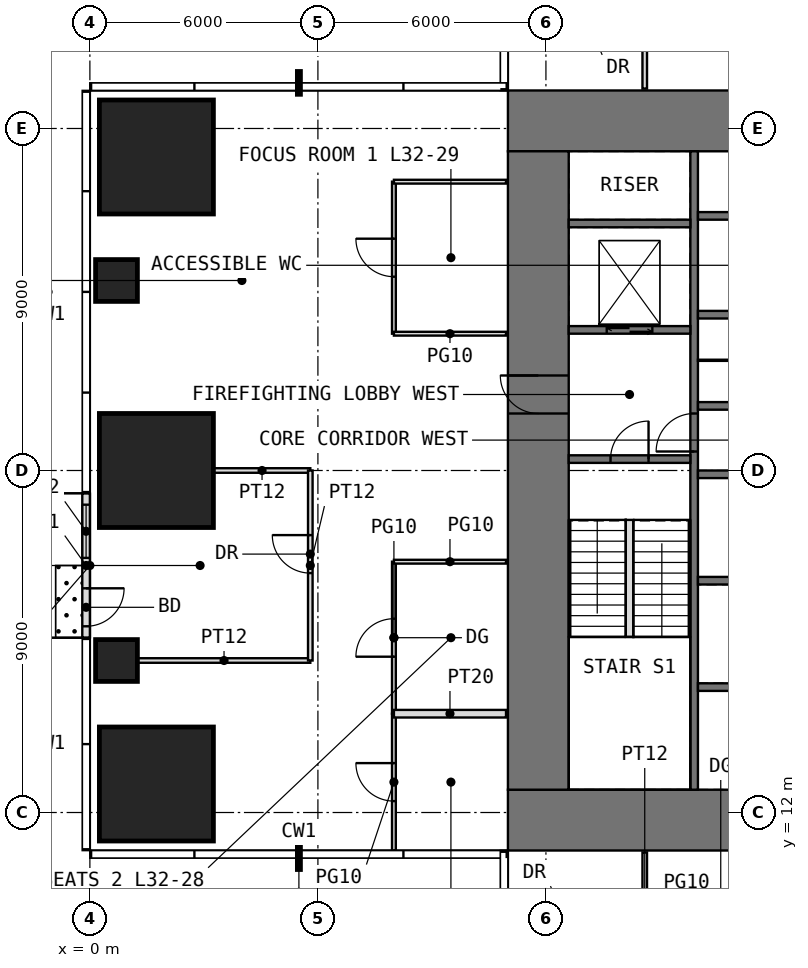
"""IFC4 building model, lengths in metres.
Left out: names, types, materials, properties, quantities, classifications, styles, units other than length and angle.
Written with IfcOpenShell. Run it as: python <this file> out.ifc"""

import sys

from ifc_helpers import new_model, si_unit, direction, frame, frame_2d, origin, origin_2d, place, context, subcontext, project, spatial, rectangle, extrude, element, fill, save


model = new_model("IFC4")
c1 = context("Model", 3, precision=1e-05, world=origin(), true_north=direction((0.0, 1.0)))
c2 = subcontext(c1, "Body", "Model", "MODEL_VIEW")
j1 = project(units=[si_unit("LENGTHUNIT", "METRE"), si_unit("PLANEANGLEUNIT", "RADIAN")], contexts=[c1])
p1 = place(None, origin())
s1 = spatial("IfcSite", under=j1, at=p1, CompositionType="ELEMENT")
p2 = place(p1, origin())
s2 = spatial("IfcBuilding", under=s1, at=p2, CompositionType="ELEMENT")
p3 = place(p2, frame((0.0, 0.0, 136.5)))
s3 = spatial("IfcBuildingStorey", under=s2, at=p3, CompositionType="ELEMENT", Elevation=136.5)
p4 = place(p3, frame((1.75, 12.75, 0.0), z_axis=(0.0, 0.0, 1.0), x_axis=(1.0, 0.0, 0.0)))
e1 = element("IfcColumn", 1, at=p4, inside=s3, PredefinedType="COLUMN", context=c2, shape_type="SweptSolid", body=[
    extrude(rectangle(XDim=3.0, YDim=3.0, at=origin_2d()), origin(), (0.0, 0.0, 1.0), 4.0),
])
p5 = place(p3, frame((0.7, 16.0, 0.0), z_axis=(0.0, 0.0, 1.0), x_axis=(1.0, 0.0, 0.0)))
e2 = element("IfcColumn", 2, at=p5, inside=s3, PredefinedType="COLUMN", context=c2, shape_type="SweptSolid", body=[
    extrude(rectangle(XDim=1.1, YDim=1.1, at=origin_2d()), origin(), (0.0, 0.0, 1.0), 4.0),
])
p6 = place(p3, frame((1.75, 21.0, 0.0), z_axis=(0.0, 0.0, 1.0), x_axis=(1.0, 0.0, 0.0)))
e3 = element("IfcColumn", 3, at=p6, inside=s3, PredefinedType="COLUMN", context=c2, shape_type="SweptSolid", body=[
    extrude(rectangle(XDim=3.0, YDim=3.0, at=origin_2d()), origin(), (0.0, 0.0, 1.0), 4.0),
])
p7 = place(p3, frame((0.7, 26.0, 0.0), z_axis=(0.0, 0.0, 1.0), x_axis=(1.0, 0.0, 0.0)))
e4 = element("IfcColumn", 4, at=p7, inside=s3, PredefinedType="COLUMN", context=c2, shape_type="SweptSolid", body=[
    extrude(rectangle(XDim=1.1, YDim=1.1, at=origin_2d()), origin(), (0.0, 0.0, 1.0), 4.0),
])
p8 = place(p3, frame((1.75, 29.25, 0.0), z_axis=(0.0, 0.0, 1.0), x_axis=(1.0, 0.0, 0.0)))
e5 = element("IfcColumn", 5, at=p8, inside=s3, PredefinedType="COLUMN", context=c2, shape_type="SweptSolid", body=[
    extrude(rectangle(XDim=3.0, YDim=3.0, at=origin_2d()), origin(), (0.0, 0.0, 1.0), 4.0),
])
p9 = place(p3, frame((-0.1, 20.4, 0.0), z_axis=(0.0, 0.0, 1.0), x_axis=(0.0, -1.0, 0.0)))
e6 = element("IfcWall", 6, at=p9, inside=s3, PredefinedType="USERDEFINED", context=c2, shape_type="SweptSolid", body=[
    extrude(rectangle(XDim=3.8, YDim=0.2, at=frame_2d((1.9, 0.0))), origin(), (0.0, 0.0, 1.0), 3.75),
])
p10 = place(p9, frame((2.5, 0.0, 0.0)))
e7 = element("IfcOpeningElement", 7, at=p10, cuts=e6, PredefinedType="OPENING", context=c2, shape_type="SweptSolid", body=[
    extrude(rectangle(XDim=1.0, YDim=2.4, at=frame_2d((0.5, 1.2))), frame((0.0, 0.11, 0.0), z_axis=(0.0, -1.0, 0.0), x_axis=(1.0, 0.0, 0.0)), (0.0, 0.0, 1.0), 0.22),
])
p11 = place(p9, frame((0.3, 0.0, 0.3)))
e8 = element("IfcOpeningElement", 8, at=p11, cuts=e6, PredefinedType="OPENING", context=c2, shape_type="SweptSolid", body=[
    extrude(rectangle(XDim=1.4, YDim=2.7, at=frame_2d((0.7, 1.35))), frame((0.0, 0.11, 0.0), z_axis=(0.0, -1.0, 0.0), x_axis=(1.0, 0.0, 0.0)), (0.0, 0.0, 1.0), 0.22),
])
p12 = place(p3, frame((11.0, 11.8, -0.05), z_axis=(0.0, 0.0, 1.0), x_axis=(1.0, 0.0, 0.0)))
e9 = element("IfcWall", 9, at=p12, inside=s3, PredefinedType="SHEAR", context=c2, shape_type="SweptSolid", body=[
    extrude(rectangle(XDim=20.0, YDim=1.6, at=frame_2d((10.0, 0.0))), origin(), (0.0, 0.0, 1.0), 4.0),
])
p13 = place(p12, frame((9.0, 0.0, 0.05)))
e10 = element("IfcOpeningElement", 10, at=p13, cuts=e9, PredefinedType="OPENING", context=c2, shape_type="SweptSolid", body=[
    extrude(rectangle(XDim=2.0, YDim=2.2, at=frame_2d((1.0, 1.1))), frame((0.0, 0.81, 0.0), z_axis=(0.0, -1.0, 0.0), x_axis=(1.0, 0.0, 0.0)), (0.0, 0.0, 1.0), 1.62),
])
p14 = place(p3, frame((11.0, 30.2, -0.05), z_axis=(0.0, 0.0, 1.0), x_axis=(1.0, 0.0, 0.0)))
e11 = element("IfcWall", 11, at=p14, inside=s3, PredefinedType="SHEAR", context=c2, shape_type="SweptSolid", body=[
    extrude(rectangle(XDim=20.0, YDim=1.6, at=frame_2d((10.0, 0.0))), origin(), (0.0, 0.0, 1.0), 4.0),
])
p15 = place(p14, frame((9.0, 0.0, 0.05)))
e12 = element("IfcOpeningElement", 12, at=p15, cuts=e11, PredefinedType="OPENING", context=c2, shape_type="SweptSolid", body=[
    extrude(rectangle(XDim=2.0, YDim=2.2, at=frame_2d((1.0, 1.1))), frame((0.0, 0.81, 0.0), z_axis=(0.0, -1.0, 0.0), x_axis=(1.0, 0.0, 0.0)), (0.0, 0.0, 1.0), 1.62),
])
p16 = place(p3, frame((11.8, 12.6, -0.05), z_axis=(0.0, 0.0, 1.0), x_axis=(0.0, 1.0, 0.0)))
e13 = element("IfcWall", 13, at=p16, inside=s3, PredefinedType="SHEAR", context=c2, shape_type="SweptSolid", body=[
    extrude(rectangle(XDim=16.8, YDim=1.6, at=frame_2d((8.4, 0.0))), origin(), (0.0, 0.0, 1.0), 4.0),
])
p17 = place(p16, frame((9.9, 0.0, 0.05)))
e14 = element("IfcOpeningElement", 14, at=p17, cuts=e13, PredefinedType="OPENING", context=c2, shape_type="SweptSolid", body=[
    extrude(rectangle(XDim=1.0, YDim=2.2, at=frame_2d((0.5, 1.1))), frame((0.0, 0.81, 0.0), z_axis=(0.0, -1.0, 0.0), x_axis=(1.0, 0.0, 0.0)), (0.0, 0.0, 1.0), 1.62),
])
p18 = place(p3, frame((15.9, 12.6, -0.05), z_axis=(0.0, 0.0, 1.0), x_axis=(0.0, 1.0, 0.0)))
e15 = element("IfcWall", 15, at=p18, inside=s3, PredefinedType="SHEAR", context=c2, shape_type="SweptSolid", body=[
    extrude(rectangle(XDim=16.8, YDim=0.2, at=frame_2d((8.4, 0.0))), origin(), (0.0, 0.0, 1.0), 4.0),
])
p19 = place(p18, frame((8.9, 0.0, 0.05)))
e16 = element("IfcOpeningElement", 16, at=p19, cuts=e15, PredefinedType="OPENING", context=c2, shape_type="SweptSolid", body=[
    extrude(rectangle(XDim=1.0, YDim=2.2, at=frame_2d((0.5, 1.1))), frame((0.0, 0.11, 0.0), z_axis=(0.0, -1.0, 0.0), x_axis=(1.0, 0.0, 0.0)), (0.0, 0.0, 1.0), 0.22),
])
p20 = place(p3, frame((12.6, 21.3, -0.05), z_axis=(0.0, 0.0, 1.0), x_axis=(1.0, 0.0, 0.0)))
e17 = element("IfcWall", 17, at=p20, inside=s3, PredefinedType="SHEAR", context=c2, shape_type="SweptSolid", body=[
    extrude(rectangle(XDim=3.2, YDim=0.2, at=frame_2d((1.6, 0.0))), origin(), (0.0, 0.0, 1.0), 4.0),
])
p21 = place(p20, frame((1.1, 0.0, 0.05)))
e18 = element("IfcOpeningElement", 18, at=p21, cuts=e17, PredefinedType="OPENING", context=c2, shape_type="SweptSolid", body=[
    extrude(rectangle(XDim=1.0, YDim=2.2, at=frame_2d((0.5, 1.1))), frame((0.0, 0.11, 0.0), z_axis=(0.0, -1.0, 0.0), x_axis=(1.0, 0.0, 0.0)), (0.0, 0.0, 1.0), 0.22),
])
p22 = place(p3, frame((12.6, 24.7, -0.05), z_axis=(0.0, 0.0, 1.0), x_axis=(1.0, 0.0, 0.0)))
e19 = element("IfcWall", 19, at=p22, inside=s3, PredefinedType="SHEAR", context=c2, shape_type="SweptSolid", body=[
    extrude(rectangle(XDim=3.2, YDim=0.2, at=frame_2d((1.6, 0.0))), origin(), (0.0, 0.0, 1.0), 4.0),
])
p23 = place(p22, frame((1.0, 0.0, 0.05)))
e20 = element("IfcOpeningElement", 20, at=p23, cuts=e19, PredefinedType="OPENING", context=c2, shape_type="SweptSolid", body=[
    extrude(rectangle(XDim=1.2, YDim=2.2, at=frame_2d((0.6, 1.1))), frame((0.0, 0.11, 0.0), z_axis=(0.0, -1.0, 0.0), x_axis=(1.0, 0.0, 0.0)), (0.0, 0.0, 1.0), 0.22),
])
for number, where, z_axis, x_axis in (
    (21, (12.6, 27.5, -0.05), (0.0, 0.0, 1.0), (1.0, 0.0, 0.0)),
    (22, (16.0, 15.3, -0.05), (0.0, 0.0, 1.0), (1.0, 0.0, 0.0)),
    (23, (16.0, 18.1, -0.05), (0.0, 0.0, 1.0), (1.0, 0.0, 0.0)),
    (24, (16.0, 20.9, -0.05), (0.0, 0.0, 1.0), (1.0, 0.0, 0.0)),
    (25, (16.0, 22.7, -0.05), (0.0, 0.0, 1.0), (1.0, 0.0, 0.0)),
    (26, (16.0, 25.1, -0.05), (0.0, 0.0, 1.0), (1.0, 0.0, 0.0)),
    (27, (16.0, 27.7, -0.05), (0.0, 0.0, 1.0), (1.0, 0.0, 0.0)),
):
    element("IfcWall", number, at=place(p3, frame(where, z_axis=z_axis, x_axis=x_axis)), inside=s3, PredefinedType="SHEAR", context=c2, shape_type="SweptSolid", body=[
        extrude(rectangle(XDim=3.2, YDim=0.2, at=frame_2d((1.6, 0.0))), origin(), (0.0, 0.0, 1.0), 4.0),
    ])
p24 = place(p3, frame((16.0, 23.9, 0.0), z_axis=(0.0, 0.0, 1.0), x_axis=(1.0, 0.0, 0.0)))
e28 = element("IfcWall", 28, at=p24, inside=s3, PredefinedType="PARTITIONING", context=c2, shape_type="SweptSolid", body=[
    extrude(rectangle(XDim=1.4, YDim=0.03, at=frame_2d((0.7, 0.0))), origin(), (0.0, 0.0, 1.0), 3.75),
])
p25 = place(p3, frame((1.26, 16.0, 0.0), z_axis=(0.0, 0.0, 1.0), x_axis=(1.0, 0.0, 0.0)))
e29 = element("IfcWall", 29, at=p25, inside=s3, PredefinedType="PARTITIONING", context=c2, shape_type="SweptSolid", body=[
    extrude(rectangle(XDim=4.54, YDim=0.12, at=frame_2d((2.27, 0.0))), origin(), (0.0, 0.0, 1.0), 3.75),
])
p26 = place(p3, frame((3.26, 21.0, 0.0), z_axis=(0.0, 0.0, 1.0), x_axis=(1.0, 0.0, 0.0)))
e30 = element("IfcWall", 30, at=p26, inside=s3, PredefinedType="PARTITIONING", context=c2, shape_type="SweptSolid", body=[
    extrude(rectangle(XDim=2.54, YDim=0.12, at=frame_2d((1.27, 0.0))), origin(), (0.0, 0.0, 1.0), 3.75),
])
p27 = place(p3, frame((5.8, 16.0, 0.0), z_axis=(0.0, 0.0, 1.0), x_axis=(0.0, 1.0, 0.0)))
e31 = element("IfcWall", 31, at=p27, inside=s3, PredefinedType="PARTITIONING", context=c2, shape_type="SweptSolid", body=[
    extrude(rectangle(XDim=5.0, YDim=0.12, at=frame_2d((2.5, 0.0))), origin(), (0.0, 0.0, 1.0), 3.75),
])
p28 = place(p27, frame((2.3, 0.0, 0.0)))
e32 = element("IfcOpeningElement", 32, at=p28, cuts=e31, PredefinedType="OPENING", context=c2, shape_type="SweptSolid", body=[
    extrude(rectangle(XDim=1.0, YDim=2.2, at=frame_2d((0.5, 1.1))), frame((0.0, 0.07, 0.0), z_axis=(0.0, -1.0, 0.0), x_axis=(1.0, 0.0, 0.0)), (0.0, 0.0, 1.0), 0.14),
])
p29 = place(p3, frame((8.0, 11.0, 0.0), z_axis=(0.0, 0.0, 1.0), x_axis=(0.0, 1.0, 0.0)))
e33 = element("IfcWall", 33, at=p29, inside=s3, PredefinedType="PARTITIONING", context=c2, shape_type="SweptSolid", body=[
    extrude(rectangle(XDim=3.6, YDim=0.1, at=frame_2d((1.8, 0.0))), origin(), (0.0, 0.0, 1.0), 3.75),
])
p30 = place(p29, frame((1.3, 0.0, 0.0)))
e34 = element("IfcOpeningElement", 34, at=p30, cuts=e33, PredefinedType="OPENING", context=c2, shape_type="SweptSolid", body=[
    extrude(rectangle(XDim=1.0, YDim=2.4, at=frame_2d((0.5, 1.2))), frame((0.0, 0.06, 0.0), z_axis=(0.0, -1.0, 0.0), x_axis=(1.0, 0.0, 0.0)), (0.0, 0.0, 1.0), 0.12),
])
p31 = place(p3, frame((8.0, 14.6, 0.0), z_axis=(0.0, 0.0, 1.0), x_axis=(0.0, 1.0, 0.0)))
e35 = element("IfcWall", 35, at=p31, inside=s3, PredefinedType="PARTITIONING", context=c2, shape_type="SweptSolid", body=[
    extrude(rectangle(XDim=4.0, YDim=0.1, at=frame_2d((2.0, 0.0))), origin(), (0.0, 0.0, 1.0), 3.75),
])
p32 = place(p31, frame((1.5, 0.0, 0.0)))
e36 = element("IfcOpeningElement", 36, at=p32, cuts=e35, PredefinedType="OPENING", context=c2, shape_type="SweptSolid", body=[
    extrude(rectangle(XDim=1.0, YDim=2.4, at=frame_2d((0.5, 1.2))), frame((0.0, 0.06, 0.0), z_axis=(0.0, -1.0, 0.0), x_axis=(1.0, 0.0, 0.0)), (0.0, 0.0, 1.0), 0.12),
])
p33 = place(p3, frame((8.0, 14.6, 0.0), z_axis=(0.0, 0.0, 1.0), x_axis=(1.0, 0.0, 0.0)))
e37 = element("IfcWall", 37, at=p33, inside=s3, PredefinedType="PARTITIONING", context=c2, shape_type="SweptSolid", body=[
    extrude(rectangle(XDim=2.95, YDim=0.2, at=frame_2d((1.475, 0.0))), origin(), (0.0, 0.0, 1.0), 3.75),
])
p34 = place(p3, frame((8.0, 18.6, 0.0), z_axis=(0.0, 0.0, 1.0), x_axis=(1.0, 0.0, 0.0)))
e38 = element("IfcWall", 38, at=p34, inside=s3, PredefinedType="PARTITIONING", context=c2, shape_type="SweptSolid", body=[
    extrude(rectangle(XDim=2.95, YDim=0.1, at=frame_2d((1.475, 0.0))), origin(), (0.0, 0.0, 1.0), 3.75),
])
p35 = place(p3, frame((8.0, 24.6, 0.0), z_axis=(0.0, 0.0, 1.0), x_axis=(0.0, 1.0, 0.0)))
e39 = element("IfcWall", 39, at=p35, inside=s3, PredefinedType="PARTITIONING", context=c2, shape_type="SweptSolid", body=[
    extrude(rectangle(XDim=4.0, YDim=0.1, at=frame_2d((2.0, 0.0))), origin(), (0.0, 0.0, 1.0), 3.75),
])
p36 = place(p35, frame((1.5, 0.0, 0.0)))
e40 = element("IfcOpeningElement", 40, at=p36, cuts=e39, PredefinedType="OPENING", context=c2, shape_type="SweptSolid", body=[
    extrude(rectangle(XDim=1.0, YDim=2.4, at=frame_2d((0.5, 1.2))), frame((0.0, 0.06, 0.0), z_axis=(0.0, -1.0, 0.0), x_axis=(1.0, 0.0, 0.0)), (0.0, 0.0, 1.0), 0.12),
])
for number, where, z_axis, x_axis in (
    (41, (8.0, 24.6, 0.0), (0.0, 0.0, 1.0), (1.0, 0.0, 0.0)),
    (42, (8.0, 28.6, 0.0), (0.0, 0.0, 1.0), (1.0, 0.0, 0.0)),
):
    element("IfcWall", number, at=place(p3, frame(where, z_axis=z_axis, x_axis=x_axis)), inside=s3, PredefinedType="PARTITIONING", context=c2, shape_type="SweptSolid", body=[
        extrude(rectangle(XDim=2.95, YDim=0.1, at=frame_2d((1.475, 0.0))), origin(), (0.0, 0.0, 1.0), 3.75),
    ])
for number, where, z_axis, x_axis in (
    (43, (14.6, 8.5, 0.0), (0.0, 0.0, 1.0), (0.0, 1.0, 0.0)),
    (44, (14.6, 31.05, 0.0), (0.0, 0.0, 1.0), (0.0, 1.0, 0.0)),
):
    element("IfcWall", number, at=place(p3, frame(where, z_axis=z_axis, x_axis=x_axis)), inside=s3, PredefinedType="PARTITIONING", context=c2, shape_type="SweptSolid", body=[
        extrude(rectangle(XDim=2.45, YDim=0.12, at=frame_2d((1.225, 0.0))), origin(), (0.0, 0.0, 1.0), 3.75),
    ])
p37 = place(p3, frame((14.2, 16.62, 0.0), z_axis=(0.0, 0.0, 1.0), x_axis=(0.0, 1.0, 0.0)))
e45 = element("IfcWall", 45, at=p37, inside=s3, PredefinedType="PARTITIONING", context=c2, shape_type="SweptSolid", body=[
    extrude(rectangle(XDim=3.08, YDim=0.2, at=frame_2d((1.54, 0.0))), origin(), (0.0, 0.0, 1.0), 4.0),
])
p38 = place(p10, origin())
e46 = element("IfcDoor", 46, at=p38, inside=s3, OperationType="SINGLE_SWING_LEFT", PredefinedType="DOOR", context=c2, shape_type="SweptSolid", body=[
    extrude(rectangle(XDim=1.0, YDim=2.4, at=frame_2d((0.5, 1.2))), frame((0.0, 0.025, 0.0), z_axis=(0.0, -1.0, 0.0), x_axis=(1.0, 0.0, 0.0)), (0.0, 0.0, 1.0), 0.05),
])
fill(e7, e46)
p39 = place(p11, origin())
e47 = element("IfcWindow", 47, at=p39, inside=s3, PartitioningType="SINGLE_PANEL", PredefinedType="WINDOW", context=c2, shape_type="SweptSolid", body=[
    extrude(rectangle(XDim=1.4, YDim=2.7, at=frame_2d((0.7, 1.35))), frame((0.0, 0.03, 0.0), z_axis=(0.0, -1.0, 0.0), x_axis=(1.0, 0.0, 0.0)), (0.0, 0.0, 1.0), 0.06),
])
fill(e8, e47)
p40 = place(p17, origin())
e48 = element("IfcDoor", 48, at=p40, inside=s3, OperationType="SINGLE_SWING_RIGHT", PredefinedType="DOOR", context=c2, shape_type="SweptSolid", body=[
    extrude(rectangle(XDim=1.0, YDim=2.2, at=frame_2d((0.5, 1.1))), frame((0.0, 0.025, 0.0), z_axis=(0.0, -1.0, 0.0), x_axis=(1.0, 0.0, 0.0)), (0.0, 0.0, 1.0), 0.05),
])
fill(e14, e48)
p41 = place(p21, origin())
e49 = element("IfcDoor", 49, at=p41, inside=s3, OperationType="SINGLE_SWING_RIGHT", PredefinedType="DOOR", context=c2, shape_type="SweptSolid", body=[
    extrude(rectangle(XDim=1.0, YDim=2.2, at=frame_2d((0.5, 1.1))), frame((0.0, 0.025, 0.0), z_axis=(0.0, -1.0, 0.0), x_axis=(1.0, 0.0, 0.0)), (0.0, 0.0, 1.0), 0.05),
])
fill(e18, e49)
p42 = place(p19, origin())
e50 = element("IfcDoor", 50, at=p42, inside=s3, OperationType="SINGLE_SWING_LEFT", PredefinedType="DOOR", context=c2, shape_type="SweptSolid", body=[
    extrude(rectangle(XDim=1.0, YDim=2.2, at=frame_2d((0.5, 1.1))), frame((0.0, 0.025, 0.0), z_axis=(0.0, -1.0, 0.0), x_axis=(1.0, 0.0, 0.0)), (0.0, 0.0, 1.0), 0.05),
])
fill(e16, e50)
p43 = place(p30, origin())
e51 = element("IfcDoor", 51, at=p43, inside=s3, OperationType="SINGLE_SWING_RIGHT", PredefinedType="DOOR", context=c2, shape_type="SweptSolid", body=[
    extrude(rectangle(XDim=1.0, YDim=2.4, at=frame_2d((0.5, 1.2))), frame((0.0, 0.025, 0.0), z_axis=(0.0, -1.0, 0.0), x_axis=(1.0, 0.0, 0.0)), (0.0, 0.0, 1.0), 0.05),
])
fill(e34, e51)
p44 = place(p32, origin())
e52 = element("IfcDoor", 52, at=p44, inside=s3, OperationType="SINGLE_SWING_LEFT", PredefinedType="DOOR", context=c2, shape_type="SweptSolid", body=[
    extrude(rectangle(XDim=1.0, YDim=2.4, at=frame_2d((0.5, 1.2))), frame((0.0, 0.025, 0.0), z_axis=(0.0, -1.0, 0.0), x_axis=(1.0, 0.0, 0.0)), (0.0, 0.0, 1.0), 0.05),
])
fill(e36, e52)
p45 = place(p36, origin())
e53 = element("IfcDoor", 53, at=p45, inside=s3, OperationType="SINGLE_SWING_RIGHT", PredefinedType="DOOR", context=c2, shape_type="SweptSolid", body=[
    extrude(rectangle(XDim=1.0, YDim=2.4, at=frame_2d((0.5, 1.2))), frame((0.0, 0.025, 0.0), z_axis=(0.0, -1.0, 0.0), x_axis=(1.0, 0.0, 0.0)), (0.0, 0.0, 1.0), 0.05),
])
fill(e40, e53)
p46 = place(p28, origin())
e54 = element("IfcDoor", 54, at=p46, inside=s3, OperationType="SINGLE_SWING_RIGHT", PredefinedType="DOOR", context=c2, shape_type="SweptSolid", body=[
    extrude(rectangle(XDim=1.0, YDim=2.2, at=frame_2d((0.5, 1.1))), frame((0.0, 0.025, 0.0), z_axis=(0.0, -1.0, 0.0), x_axis=(1.0, 0.0, 0.0)), (0.0, 0.0, 1.0), 0.05),
])
fill(e32, e54)
p47 = place(p23, origin())
e55 = element("IfcDoor", 55, at=p47, inside=s3, OperationType="DOUBLE_DOOR_SLIDING", PredefinedType="DOOR", context=c2, shape_type="SweptSolid", body=[
    extrude(rectangle(XDim=1.2, YDim=2.2, at=frame_2d((0.6, 1.1))), frame((0.0, 0.025, 0.0), z_axis=(0.0, -1.0, 0.0), x_axis=(1.0, 0.0, 0.0)), (0.0, 0.0, 1.0), 0.05),
])
fill(e20, e55)
save(model, sys.argv[1])
